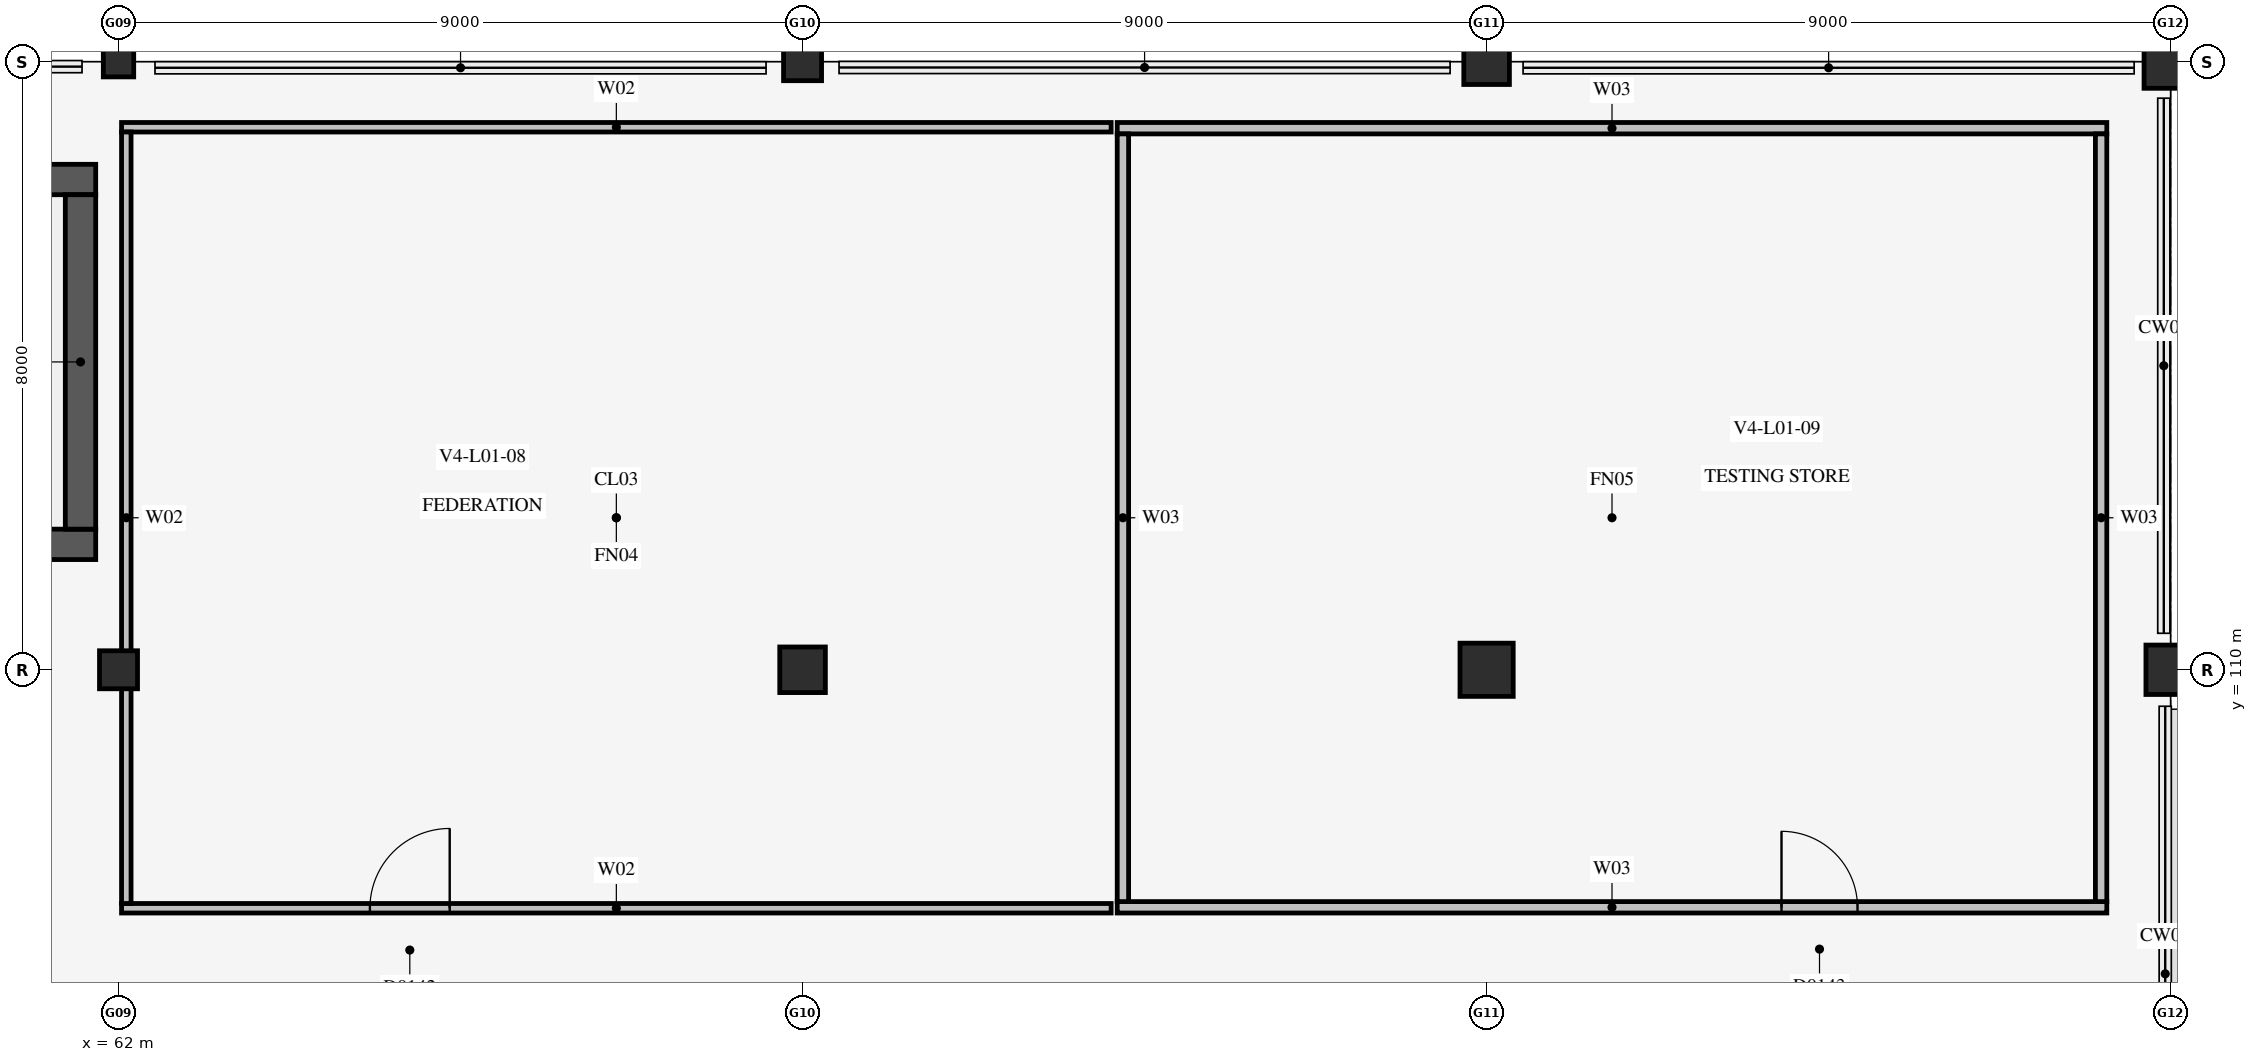
"""IFC4 building model, lengths in metres.
Left out: names, types, materials, properties, quantities, classifications, styles, units other than length and angle.
Written with IfcOpenShell. Run it as: python <this file> out.ifc"""

import sys

from ifc_helpers import new_model, si_unit, direction, frame, frame_2d, origin, origin_2d, place, context, subcontext, project, spatial, rectangle, extrude, element, fill, save


model = new_model("IFC4")
c1 = context("Model", 3, precision=1e-05, world=origin(), true_north=direction((0.0, 1.0)))
c2 = subcontext(c1, "Body", "Model", "MODEL_VIEW")
j1 = project(units=[si_unit("LENGTHUNIT", "METRE"), si_unit("PLANEANGLEUNIT", "RADIAN")], contexts=[c1])
p1 = place(None, origin())
s1 = spatial("IfcSite", under=j1, at=p1, CompositionType="ELEMENT")
p2 = place(p1, origin())
s2 = spatial("IfcBuilding", under=s1, at=p2, CompositionType="ELEMENT")
p3 = place(p2, frame((0.0, 0.0, 5.4)))
s3 = spatial("IfcBuildingStorey", under=s2, at=p3, CompositionType="ELEMENT", Elevation=5.4)
p4 = place(p3, frame((52.2, 111.65, 0.0), z_axis=(0.0, 0.0, 1.0), x_axis=(1.0, 0.0, 0.0)))
e1 = element("IfcWall", 1, at=p4, inside=s3, PredefinedType="SHEAR", context=c2, shape_type="SweptSolid", body=[
    extrude(rectangle(XDim=9.5, YDim=0.4, at=frame_2d((4.75, 0.0))), origin(), (0.0, 0.0, 1.0), 4.58),
])
p5 = place(p4, frame((0.48, 0.0, 0.0)))
e2 = element("IfcOpeningElement", 2, at=p5, cuts=e1, PredefinedType="OPENING", context=c2, shape_type="SweptSolid", body=[
    extrude(rectangle(XDim=1.5, YDim=2.3, at=frame_2d((0.75, 1.15))), frame((0.0, 0.212, 0.0), z_axis=(0.0, -1.0, 0.0), x_axis=(1.0, 0.0, 0.0)), (0.0, 0.0, 1.0), 0.424),
])
p6 = place(p3, frame((52.2, 116.45, 0.0), z_axis=(0.0, 0.0, 1.0), x_axis=(1.0, 0.0, 0.0)))
e3 = element("IfcWall", 3, at=p6, inside=s3, PredefinedType="SHEAR", context=c2, shape_type="SweptSolid", body=[
    extrude(rectangle(XDim=9.5, YDim=0.4, at=frame_2d((4.75, 0.0))), origin(), (0.0, 0.0, 1.0), 4.58),
])
p7 = place(p3, frame((61.5, 111.85, 0.0), z_axis=(0.0, 0.0, 1.0), x_axis=(0.0, 1.0, 0.0)))
e4 = element("IfcWall", 4, at=p7, inside=s3, PredefinedType="SHEAR", context=c2, shape_type="SweptSolid", body=[
    extrude(rectangle(XDim=4.4, YDim=0.4, at=frame_2d((2.2, 0.0))), origin(), (0.0, 0.0, 1.0), 4.58),
])
p8 = place(p3, frame((62.0, 110.0, 0.0), z_axis=(0.0, 0.0, 1.0), x_axis=(1.0, 0.0, 0.0)))
e5 = element("IfcColumn", 5, at=p8, inside=s3, PredefinedType="COLUMN", context=c2, shape_type="SweptSolid", body=[
    extrude(rectangle(XDim=0.5, YDim=0.5, at=origin_2d()), origin(), (0.0, 0.0, 1.0), 4.8),
])
p9 = place(p3, frame((62.0, 118.0, 0.0), z_axis=(0.0, 0.0, 1.0), x_axis=(1.0, 0.0, 0.0)))
e6 = element("IfcColumn", 6, at=p9, inside=s3, PredefinedType="COLUMN", context=c2, shape_type="SweptSolid", body=[
    extrude(rectangle(XDim=0.4, YDim=0.4, at=origin_2d()), origin(), (0.0, 0.0, 1.0), 4.8),
])
p10 = place(p3, frame((71.0, 110.0, 0.0), z_axis=(0.0, 0.0, 1.0), x_axis=(1.0, 0.0, 0.0)))
e7 = element("IfcColumn", 7, at=p10, inside=s3, PredefinedType="COLUMN", context=c2, shape_type="SweptSolid", body=[
    extrude(rectangle(XDim=0.6, YDim=0.6, at=origin_2d()), origin(), (0.0, 0.0, 1.0), 4.5),
])
p11 = place(p3, frame((71.0, 118.0, 0.0), z_axis=(0.0, 0.0, 1.0), x_axis=(1.0, 0.0, 0.0)))
e8 = element("IfcColumn", 8, at=p11, inside=s3, PredefinedType="COLUMN", context=c2, shape_type="SweptSolid", body=[
    extrude(rectangle(XDim=0.5, YDim=0.5, at=origin_2d()), origin(), (0.0, 0.0, 1.0), 4.5),
])
p12 = place(p3, frame((80.0, 110.0, 0.0), z_axis=(0.0, 0.0, 1.0), x_axis=(1.0, 0.0, 0.0)))
e9 = element("IfcColumn", 9, at=p12, inside=s3, PredefinedType="COLUMN", context=c2, shape_type="SweptSolid", body=[
    extrude(rectangle(XDim=0.7, YDim=0.7, at=origin_2d()), origin(), (0.0, 0.0, 1.0), 4.5),
])
p13 = place(p3, frame((80.0, 118.0, 0.0), z_axis=(0.0, 0.0, 1.0), x_axis=(1.0, 0.0, 0.0)))
e10 = element("IfcColumn", 10, at=p13, inside=s3, PredefinedType="COLUMN", context=c2, shape_type="SweptSolid", body=[
    extrude(rectangle(XDim=0.6, YDim=0.6, at=origin_2d()), origin(), (0.0, 0.0, 1.0), 4.5),
])
p14 = place(p3, frame((89.0, 110.0, 0.0), z_axis=(0.0, 0.0, 1.0), x_axis=(1.0, 0.0, 0.0)))
e11 = element("IfcColumn", 11, at=p14, inside=s3, PredefinedType="COLUMN", context=c2, shape_type="SweptSolid", body=[
    extrude(rectangle(XDim=0.65, YDim=0.65, at=origin_2d()), origin(), (0.0, 0.0, 1.0), 4.5),
])
p15 = place(p3, frame((89.0, 118.0, 0.0), z_axis=(0.0, 0.0, 1.0), x_axis=(1.0, 0.0, 0.0)))
e12 = element("IfcColumn", 12, at=p15, inside=s3, PredefinedType="COLUMN", context=c2, shape_type="SweptSolid", body=[
    extrude(rectangle(XDim=0.7, YDim=0.7, at=origin_2d()), origin(), (0.0, 0.0, 1.0), 4.5),
])
p16 = place(p3, frame((62.04, 106.863, 0.0), z_axis=(0.0, 0.0, 1.0), x_axis=(1.0, 0.0, 0.0)))
e13 = element("IfcWall", 13, at=p16, inside=s3, PredefinedType="PARTITIONING", context=c2, shape_type="SweptSolid", body=[
    extrude(rectangle(XDim=13.02, YDim=0.125, at=frame_2d((6.51, 0.0))), origin(), (0.0, 0.0, 1.0), 4.485),
])
p17 = place(p16, frame((3.268, 0.0, 0.0)))
e14 = element("IfcOpeningElement", 14, at=p17, cuts=e13, PredefinedType="OPENING", context=c2, shape_type="SweptSolid", body=[
    extrude(rectangle(XDim=1.05, YDim=2.15, at=frame_2d((0.525, 1.075))), frame((0.0, 0.074, 0.0), z_axis=(0.0, -1.0, 0.0), x_axis=(1.0, 0.0, 0.0)), (0.0, 0.0, 1.0), 0.149),
])
p18 = place(p3, frame((62.04, 117.137, 0.0), z_axis=(0.0, 0.0, 1.0), x_axis=(1.0, 0.0, 0.0)))
e15 = element("IfcWall", 15, at=p18, inside=s3, PredefinedType="PARTITIONING", context=c2, shape_type="SweptSolid", body=[
    extrude(rectangle(XDim=13.02, YDim=0.125, at=frame_2d((6.51, 0.0))), origin(), (0.0, 0.0, 1.0), 4.485),
])
p19 = place(p3, frame((62.103, 106.925, 0.0), z_axis=(0.0, 0.0, 1.0), x_axis=(0.0, 1.0, 0.0)))
e16 = element("IfcWall", 16, at=p19, inside=s3, PredefinedType="PARTITIONING", context=c2, shape_type="SweptSolid", body=[
    extrude(rectangle(XDim=10.15, YDim=0.125, at=frame_2d((5.075, 0.0))), origin(), (0.0, 0.0, 1.0), 3.551),
])
p20 = place(p3, frame((75.14, 106.875, 0.0), z_axis=(0.0, 0.0, 1.0), x_axis=(1.0, 0.0, 0.0)))
e17 = element("IfcWall", 17, at=p20, inside=s3, PredefinedType="PARTITIONING", context=c2, shape_type="SweptSolid", body=[
    extrude(rectangle(XDim=13.02, YDim=0.15, at=frame_2d((6.51, 0.0))), origin(), (0.0, 0.0, 1.0), 4.485),
])
p21 = place(p20, frame((8.74, 0.0, 0.0)))
e18 = element("IfcOpeningElement", 18, at=p21, cuts=e17, PredefinedType="OPENING", context=c2, shape_type="SweptSolid", body=[
    extrude(rectangle(XDim=1.0, YDim=2.2, at=frame_2d((0.5, 1.1))), frame((0.0, 0.087, 0.0), z_axis=(0.0, -1.0, 0.0), x_axis=(1.0, 0.0, 0.0)), (0.0, 0.0, 1.0), 0.174),
])
p22 = place(p3, frame((75.14, 117.125, 0.0), z_axis=(0.0, 0.0, 1.0), x_axis=(1.0, 0.0, 0.0)))
e19 = element("IfcWall", 19, at=p22, inside=s3, PredefinedType="PARTITIONING", context=c2, shape_type="SweptSolid", body=[
    extrude(rectangle(XDim=13.02, YDim=0.15, at=frame_2d((6.51, 0.0))), origin(), (0.0, 0.0, 1.0), 4.485),
])
for number, where, z_axis, x_axis in (
    (20, (88.085, 106.95, 0.0), (0.0, 0.0, 1.0), (0.0, 1.0, 0.0)),
    (21, (75.215, 106.95, 0.0), (0.0, 0.0, 1.0), (0.0, 1.0, 0.0)),
):
    element("IfcWall", number, at=place(p3, frame(where, z_axis=z_axis, x_axis=x_axis)), inside=s3, PredefinedType="PARTITIONING", context=c2, shape_type="SweptSolid", body=[
        extrude(rectangle(XDim=10.1, YDim=0.15, at=frame_2d((5.05, 0.0))), origin(), (0.0, 0.0, 1.0), 4.485),
    ])
p23 = place(p17, origin())
e22 = element("IfcDoor", 22, at=p23, inside=s3, OperationType="SINGLE_SWING_RIGHT", PredefinedType="DOOR", context=c2, shape_type="SweptSolid", body=[
    extrude(rectangle(XDim=1.05, YDim=2.15, at=frame_2d((0.525, 1.075))), frame((0.0, 0.025, 0.0), z_axis=(0.0, -1.0, 0.0), x_axis=(1.0, 0.0, 0.0)), (0.0, 0.0, 1.0), 0.05),
])
fill(e14, e22)
p24 = place(p21, origin())
e23 = element("IfcDoor", 23, at=p24, inside=s3, OperationType="SINGLE_SWING_LEFT", PredefinedType="DOOR", context=c2, shape_type="SweptSolid", body=[
    extrude(rectangle(XDim=1.0, YDim=2.2, at=frame_2d((0.5, 1.1))), frame((0.0, 0.025, 0.0), z_axis=(0.0, -1.0, 0.0), x_axis=(1.0, 0.0, 0.0)), (0.0, 0.0, 1.0), 0.05),
])
fill(e18, e23)
save(model, sys.argv[1])
